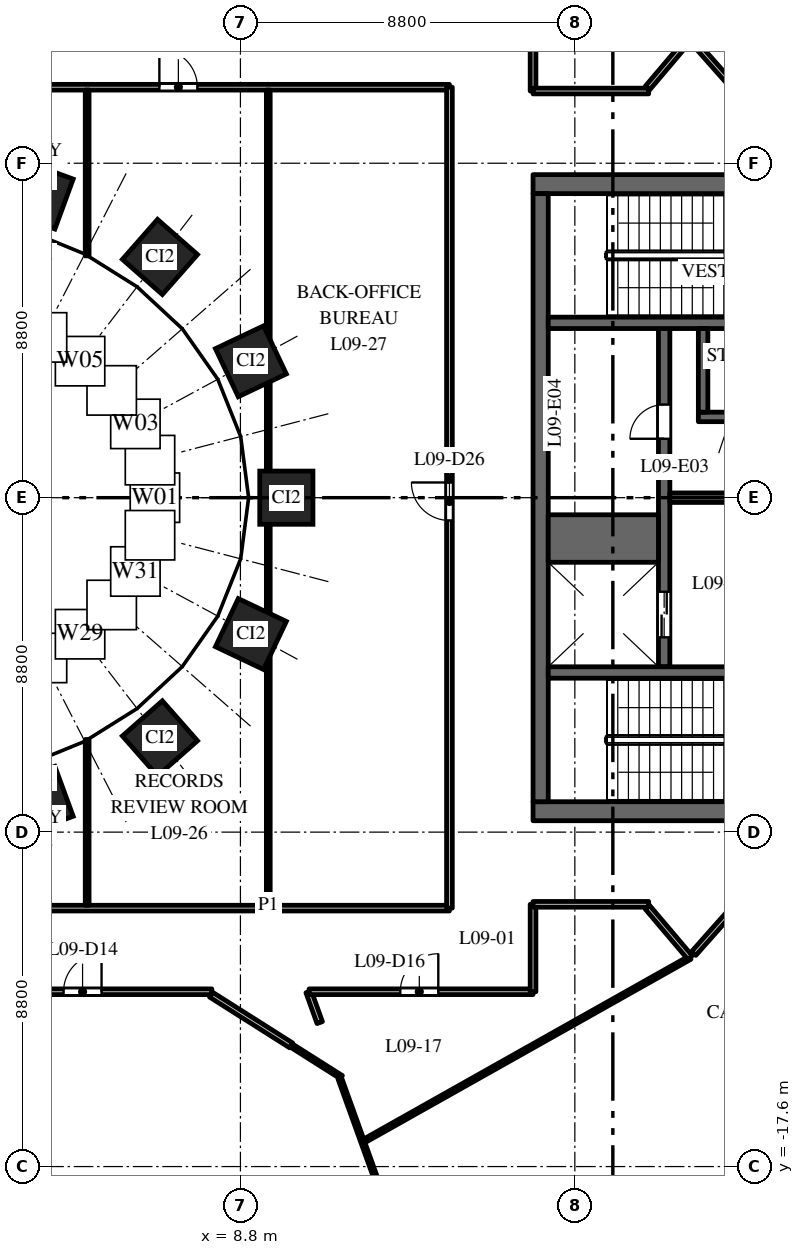
"""IFC4 building model, lengths in metres.
Left out: names, types, materials, properties, quantities, classifications, styles, units other than length and angle.
Written with IfcOpenShell. Run it as: python <this file> out.ifc"""

import sys

from ifc_helpers import new_model, si_unit, direction, frame, frame_2d, origin, origin_2d, place, context, subcontext, project, spatial, rectangle, extrude, element, fill, save


model = new_model("IFC4")
c1 = context("Model", 3, precision=1e-05, world=origin(), true_north=direction((0.0, 1.0)))
c2 = subcontext(c1, "Body", "Model", "MODEL_VIEW")
j1 = project(units=[si_unit("LENGTHUNIT", "METRE"), si_unit("PLANEANGLEUNIT", "RADIAN")], contexts=[c1])
p1 = place(None, origin())
s1 = spatial("IfcSite", under=j1, at=p1, CompositionType="ELEMENT")
p2 = place(p1, origin())
s2 = spatial("IfcBuilding", under=s1, at=p2, CompositionType="ELEMENT")
p3 = place(p2, frame((0.0, 0.0, 46.5)))
s3 = spatial("IfcBuildingStorey", under=s2, at=p3, CompositionType="ELEMENT", Elevation=46.5)
for number, where, z_axis, x_axis in (
    (1, (10.008, 0.0, 0.0), (0.0, 0.0, 1.0), (0.0, 1.0, 0.0)),
    (2, (9.076, 3.588, 0.0), (0.0, 0.0, 1.0), (-0.429, 0.903, 0.0)),
    (3, (6.682, 6.334, 0.0), (0.0, 0.0, 1.0), (-0.751, 0.66, 0.0)),
    (4, (3.501, 7.967, 0.0), (0.0, 0.0, 1.0), (-0.939, 0.344, 0.0)),
    (5, (3.501, -7.967, 0.0), (0.0, 0.0, 1.0), (0.939, 0.344, 0.0)),
    (6, (6.682, -6.334, 0.0), (0.0, 0.0, 1.0), (0.751, 0.66, 0.0)),
    (7, (9.076, -3.588, 0.0), (0.0, 0.0, 1.0), (0.429, 0.903, 0.0)),
):
    element("IfcColumn", number, at=place(p3, frame(where, z_axis=z_axis, x_axis=x_axis)), inside=s3, PredefinedType="COLUMN", context=c2, shape_type="SweptSolid", body=[
        extrude(rectangle(XDim=1.4, YDim=1.4, at=origin_2d()), origin(), (0.0, 0.0, 1.0), 4.0),
    ])
p4 = place(p3, frame((16.5, 8.25, 0.0), z_axis=(0.0, 0.0, 1.0), x_axis=(1.0, 0.0, 0.0)))
e8 = element("IfcWall", 8, at=p4, inside=s3, PredefinedType="SHEAR", context=c2, shape_type="SweptSolid", body=[
    extrude(rectangle(XDim=15.0, YDim=0.5, at=frame_2d((7.5, 0.0))), origin(), (0.0, 0.0, 1.0), 3.7),
])
p5 = place(p4, frame((6.9, 0.0, 0.0)))
e9 = element("IfcOpeningElement", 9, at=p5, cuts=e8, PredefinedType="OPENING", context=c2, shape_type="SweptSolid", body=[
    extrude(rectangle(XDim=1.2, YDim=2.1, at=frame_2d((0.6, 1.05))), frame((0.0, 0.26, 0.0), z_axis=(0.0, -1.0, 0.0), x_axis=(1.0, 0.0, 0.0)), (0.0, 0.0, 1.0), 0.52),
])
p6 = place(p4, frame((12.05, 0.0, 0.0)))
e10 = element("IfcOpeningElement", 10, at=p6, cuts=e8, PredefinedType="OPENING", context=c2, shape_type="SweptSolid", body=[
    extrude(rectangle(XDim=0.9, YDim=2.1, at=frame_2d((0.45, 1.05))), frame((0.0, 0.26, 0.0), z_axis=(0.0, -1.0, 0.0), x_axis=(1.0, 0.0, 0.0)), (0.0, 0.0, 1.0), 0.52),
])
p7 = place(p3, frame((16.5, -8.25, 0.0), z_axis=(0.0, 0.0, 1.0), x_axis=(1.0, 0.0, 0.0)))
e11 = element("IfcWall", 11, at=p7, inside=s3, PredefinedType="SHEAR", context=c2, shape_type="SweptSolid", body=[
    extrude(rectangle(XDim=15.0, YDim=0.5, at=frame_2d((7.5, 0.0))), origin(), (0.0, 0.0, 1.0), 3.7),
])
p8 = place(p7, frame((6.9, 0.0, 0.0)))
e12 = element("IfcOpeningElement", 12, at=p8, cuts=e11, PredefinedType="OPENING", context=c2, shape_type="SweptSolid", body=[
    extrude(rectangle(XDim=1.2, YDim=2.1, at=frame_2d((0.6, 1.05))), frame((0.0, 0.26, 0.0), z_axis=(0.0, -1.0, 0.0), x_axis=(1.0, 0.0, 0.0)), (0.0, 0.0, 1.0), 0.52),
])
p9 = place(p7, frame((12.425, 0.0, 0.0)))
e13 = element("IfcOpeningElement", 13, at=p9, cuts=e11, PredefinedType="OPENING", context=c2, shape_type="SweptSolid", body=[
    extrude(rectangle(XDim=0.9, YDim=2.1, at=frame_2d((0.45, 1.05))), frame((0.0, 0.26, 0.0), z_axis=(0.0, -1.0, 0.0), x_axis=(1.0, 0.0, 0.0)), (0.0, 0.0, 1.0), 0.52),
])
p10 = place(p3, frame((19.95, -4.45, 0.0), z_axis=(0.0, 0.0, 1.0), x_axis=(0.0, 1.0, 0.0)))
e14 = element("IfcWall", 14, at=p10, inside=s3, PredefinedType="SHEAR", context=c2, shape_type="SweptSolid", body=[
    extrude(rectangle(XDim=8.9, YDim=0.3, at=frame_2d((4.45, 0.0))), origin(), (0.0, 0.0, 1.0), 3.7),
])
p11 = place(p10, frame((0.775, 0.0, 0.0)))
e15 = element("IfcOpeningElement", 15, at=p11, cuts=e14, PredefinedType="OPENING", context=c2, shape_type="SweptSolid", body=[
    extrude(rectangle(XDim=1.2, YDim=2.1, at=frame_2d((0.6, 1.05))), frame((0.0, 0.16, 0.0), z_axis=(0.0, -1.0, 0.0), x_axis=(1.0, 0.0, 0.0)), (0.0, 0.0, 1.0), 0.32),
])
p12 = place(p10, frame((6.0, 0.0, 0.0)))
e16 = element("IfcOpeningElement", 16, at=p12, cuts=e14, PredefinedType="OPENING", context=c2, shape_type="SweptSolid", body=[
    extrude(rectangle(XDim=0.9, YDim=2.1, at=frame_2d((0.45, 1.05))), frame((0.0, 0.16, 0.0), z_axis=(0.0, -1.0, 0.0), x_axis=(1.0, 0.0, 0.0)), (0.0, 0.0, 1.0), 0.32),
])
p13 = place(p3, frame((20.1, 0.0, 0.0), z_axis=(0.0, 0.0, 1.0), x_axis=(1.0, 0.0, 0.0)))
e17 = element("IfcWall", 17, at=p13, inside=s3, PredefinedType="SHEAR", context=c2, shape_type="SweptSolid", body=[
    extrude(rectangle(XDim=3.28, YDim=0.25, at=frame_2d((1.64, 0.0))), origin(), (0.0, 0.0, 1.0), 3.7),
])
p14 = place(p3, frame((16.7, -8.0, 0.0), z_axis=(0.0, 0.0, 1.0), x_axis=(0.0, 1.0, 0.0)))
e18 = element("IfcWall", 18, at=p14, inside=s3, PredefinedType="SHEAR", context=c2, shape_type="SweptSolid", body=[
    extrude(rectangle(XDim=16.0, YDim=0.4, at=frame_2d((8.0, 0.0))), origin(), (0.0, 0.0, 1.0), 3.7),
])
p15 = place(p3, frame((16.9, -1.075, 0.0), z_axis=(0.0, 0.0, 1.0), x_axis=(1.0, 0.0, 0.0)))
e19 = element("IfcWall", 19, at=p15, inside=s3, PredefinedType="SHEAR", context=c2, shape_type="SweptSolid", body=[
    extrude(rectangle(XDim=2.9, YDim=1.25, at=frame_2d((1.45, 0.0))), origin(), (0.0, 0.0, 1.0), 3.7),
])
p16 = place(p3, frame((16.9, 4.6, 0.0), z_axis=(0.0, 0.0, 1.0), x_axis=(1.0, 0.0, 0.0)))
e20 = element("IfcWall", 20, at=p16, inside=s3, PredefinedType="SHEAR", context=c2, shape_type="SweptSolid", body=[
    extrude(rectangle(XDim=6.18, YDim=0.3, at=frame_2d((3.09, 0.0))), origin(), (0.0, 0.0, 1.0), 3.7),
])
p17 = place(p16, frame((4.9, 0.0, 0.0)))
e21 = element("IfcOpeningElement", 21, at=p17, cuts=e20, PredefinedType="OPENING", context=c2, shape_type="SweptSolid", body=[
    extrude(rectangle(XDim=1.1, YDim=2.1, at=frame_2d((0.55, 1.05))), frame((0.0, 0.16, 0.0), z_axis=(0.0, -1.0, 0.0), x_axis=(1.0, 0.0, 0.0)), (0.0, 0.0, 1.0), 0.32),
])
p18 = place(p3, frame((16.9, -4.6, 0.0), z_axis=(0.0, 0.0, 1.0), x_axis=(1.0, 0.0, 0.0)))
e22 = element("IfcWall", 22, at=p18, inside=s3, PredefinedType="SHEAR", context=c2, shape_type="SweptSolid", body=[
    extrude(rectangle(XDim=6.18, YDim=0.3, at=frame_2d((3.09, 0.0))), origin(), (0.0, 0.0, 1.0), 3.7),
])
p19 = place(p18, frame((4.9, 0.0, 0.0)))
e23 = element("IfcOpeningElement", 23, at=p19, cuts=e22, PredefinedType="OPENING", context=c2, shape_type="SweptSolid", body=[
    extrude(rectangle(XDim=1.1, YDim=2.1, at=frame_2d((0.55, 1.05))), frame((0.0, 0.16, 0.0), z_axis=(0.0, -1.0, 0.0), x_axis=(1.0, 0.0, 0.0)), (0.0, 0.0, 1.0), 0.32),
])
p20 = place(p3, frame((20.85, 2.125, 0.0), z_axis=(0.0, 0.0, 1.0), x_axis=(1.0, 0.0, 0.0)))
e24 = element("IfcWall", 24, at=p20, inside=s3, PredefinedType="SHEAR", context=c2, shape_type="SweptSolid", body=[
    extrude(rectangle(XDim=2.53, YDim=0.25, at=frame_2d((1.265, 0.0))), origin(), (0.0, 0.0, 1.0), 3.7),
])
p21 = place(p3, frame((20.975, 2.25, 0.0), z_axis=(0.0, 0.0, 1.0), x_axis=(0.0, 1.0, 0.0)))
e25 = element("IfcWall", 25, at=p21, inside=s3, PredefinedType="SHEAR", context=c2, shape_type="SweptSolid", body=[
    extrude(rectangle(XDim=2.2, YDim=0.25, at=frame_2d((1.1, 0.0))), origin(), (0.0, 0.0, 1.0), 3.7),
])
p22 = place(p3, frame((-14.3, -10.8, 0.0), z_axis=(0.0, 0.0, 1.0), x_axis=(1.0, 0.0, 0.0)))
e26 = element("IfcWall", 26, at=p22, inside=s3, PredefinedType="PARTITIONING", context=c2, shape_type="SweptSolid", body=[
    extrude(rectangle(XDim=28.6, YDim=0.15, at=frame_2d((14.3, 0.0))), origin(), (0.0, 0.0, 1.0), 2.85),
])
p23 = place(p22, frame((11.4, 0.0, 0.0)))
e27 = element("IfcOpeningElement", 27, at=p23, cuts=e26, PredefinedType="OPENING", context=c2, shape_type="SweptSolid", body=[
    extrude(rectangle(XDim=1.0, YDim=2.1, at=frame_2d((0.5, 1.05))), frame((0.0, 0.085, 0.0), z_axis=(0.0, -1.0, 0.0), x_axis=(1.0, 0.0, 0.0)), (0.0, 0.0, 1.0), 0.17),
])
p24 = place(p22, frame((16.167, 0.0, 0.0)))
e28 = element("IfcOpeningElement", 28, at=p24, cuts=e26, PredefinedType="OPENING", context=c2, shape_type="SweptSolid", body=[
    extrude(rectangle(XDim=1.0, YDim=2.1, at=frame_2d((0.5, 1.05))), frame((0.0, 0.085, 0.0), z_axis=(0.0, -1.0, 0.0), x_axis=(1.0, 0.0, 0.0)), (0.0, 0.0, 1.0), 0.17),
])
p25 = place(p3, frame((-14.3, 10.8, 0.0), z_axis=(0.0, 0.0, 1.0), x_axis=(1.0, 0.0, 0.0)))
e29 = element("IfcWall", 29, at=p25, inside=s3, PredefinedType="PARTITIONING", context=c2, shape_type="SweptSolid", body=[
    extrude(rectangle(XDim=28.6, YDim=0.15, at=frame_2d((14.3, 0.0))), origin(), (0.0, 0.0, 1.0), 2.85),
])
p26 = place(p25, frame((11.433, 0.0, 0.0)))
e30 = element("IfcOpeningElement", 30, at=p26, cuts=e29, PredefinedType="OPENING", context=c2, shape_type="SweptSolid", body=[
    extrude(rectangle(XDim=1.0, YDim=2.1, at=frame_2d((0.5, 1.05))), frame((0.0, 0.085, 0.0), z_axis=(0.0, -1.0, 0.0), x_axis=(1.0, 0.0, 0.0)), (0.0, 0.0, 1.0), 0.17),
])
p27 = place(p25, frame((16.2, 0.0, 0.0)))
e31 = element("IfcOpeningElement", 31, at=p27, cuts=e29, PredefinedType="OPENING", context=c2, shape_type="SweptSolid", body=[
    extrude(rectangle(XDim=1.0, YDim=2.1, at=frame_2d((0.5, 1.05))), frame((0.0, 0.085, 0.0), z_axis=(0.0, -1.0, 0.0), x_axis=(1.0, 0.0, 0.0)), (0.0, 0.0, 1.0), 0.17),
])
p28 = place(p25, frame((20.967, 0.0, 0.0)))
e32 = element("IfcOpeningElement", 32, at=p28, cuts=e29, PredefinedType="OPENING", context=c2, shape_type="SweptSolid", body=[
    extrude(rectangle(XDim=1.0, YDim=2.1, at=frame_2d((0.5, 1.05))), frame((0.0, 0.085, 0.0), z_axis=(0.0, -1.0, 0.0), x_axis=(1.0, 0.0, 0.0)), (0.0, 0.0, 1.0), 0.17),
])
p29 = place(p3, frame((1.326, -13.0, 0.0), z_axis=(0.0, 0.0, 1.0), x_axis=(1.0, 0.0, 0.0)))
e33 = element("IfcWall", 33, at=p29, inside=s3, PredefinedType="PARTITIONING", context=c2, shape_type="SweptSolid", body=[
    extrude(rectangle(XDim=6.721, YDim=0.15, at=frame_2d((3.361, 0.0))), origin(), (0.0, 0.0, 1.0), 2.85),
])
p30 = place(p29, frame((2.82, 0.0, 0.0)))
e34 = element("IfcOpeningElement", 34, at=p30, cuts=e33, PredefinedType="OPENING", context=c2, shape_type="SweptSolid", body=[
    extrude(rectangle(XDim=1.0, YDim=2.1, at=frame_2d((0.5, 1.05))), frame((0.0, 0.085, 0.0), z_axis=(0.0, -1.0, 0.0), x_axis=(1.0, 0.0, 0.0)), (0.0, 0.0, 1.0), 0.17),
])
for number, where, z_axis, x_axis in (
    (35, (4.767, -10.725, 0.0), (0.0, 0.0, 1.0), (0.0, 1.0, 0.0)),
    (36, (4.767, 6.363, 0.0), (0.0, 0.0, 1.0), (0.0, 1.0, 0.0)),
):
    element("IfcWall", number, at=place(p3, frame(where, z_axis=z_axis, x_axis=x_axis)), inside=s3, PredefinedType="PARTITIONING", context=c2, shape_type="SweptSolid", body=[
        extrude(rectangle(XDim=4.362, YDim=0.1, at=frame_2d((2.181, 0.0))), origin(), (0.0, 0.0, 1.0), 2.85),
    ])
p31 = place(p3, frame((8.028, -13.077, 0.0), z_axis=(0.0, 0.0, 1.0), x_axis=(0.844718865656, -0.53521027457, 0.0)))
e37 = element("IfcWall", 37, at=p31, inside=s3, PredefinedType="PARTITIONING", context=c2, shape_type="SweptSolid", body=[
    extrude(rectangle(XDim=2.497, YDim=0.15, at=frame_2d((1.248, 0.0))), origin(), (0.0, 0.0, 1.0), 3.7),
])
p32 = place(p3, frame((9.533, -10.725, 0.0), z_axis=(0.0, 0.0, 1.0), x_axis=(0.0, 1.0, 0.0)))
e38 = element("IfcWall", 38, at=p32, inside=s3, PredefinedType="PARTITIONING", context=c2, shape_type="SweptSolid", body=[
    extrude(rectangle(XDim=21.45, YDim=0.1, at=frame_2d((10.725, 0.0))), origin(), (0.0, 0.0, 1.0), 2.75),
])
p33 = place(p3, frame((10.137, -14.413, 0.0), z_axis=(0.0, 0.0, 1.0), x_axis=(0.844849680057, -0.535003755228, 0.0)))
e39 = element("IfcWall", 39, at=p33, inside=s3, PredefinedType="PARTITIONING", context=c2, shape_type="SweptSolid", body=[
    extrude(rectangle(XDim=1.562, YDim=0.1, at=frame_2d((0.781, 0.0))), origin(), (0.0, 0.0, 1.0), 3.7),
])
p34 = place(p3, frame((10.595, -13.0, 0.0), z_axis=(0.0, 0.0, 1.0), x_axis=(0.338378813476, -0.941009977944, 0.0)))
e40 = element("IfcWall", 40, at=p34, inside=s3, PredefinedType="PARTITIONING", context=c2, shape_type="SweptSolid", body=[
    extrude(rectangle(XDim=0.863, YDim=0.15, at=frame_2d((0.432, 0.0))), origin(), (0.0, 0.0, 1.0), 3.7),
])
p35 = place(p3, frame((10.607, -13.0, 0.0), z_axis=(0.0, 0.0, 1.0), x_axis=(1.0, 0.0, 0.0)))
e41 = element("IfcWall", 41, at=p35, inside=s3, PredefinedType="PARTITIONING", context=c2, shape_type="SweptSolid", body=[
    extrude(rectangle(XDim=5.893, YDim=0.15, at=frame_2d((2.947, 0.0))), origin(), (0.0, 0.0, 1.0), 3.7),
])
p36 = place(p35, frame((2.4, 0.0, 0.0)))
e42 = element("IfcOpeningElement", 42, at=p36, cuts=e41, PredefinedType="OPENING", context=c2, shape_type="SweptSolid", body=[
    extrude(rectangle(XDim=1.0, YDim=2.1, at=frame_2d((0.5, 1.05))), frame((0.0, 0.085, 0.0), z_axis=(0.0, -1.0, 0.0), x_axis=(1.0, 0.0, 0.0)), (0.0, 0.0, 1.0), 0.17),
])
p37 = place(p3, frame((11.416, -15.282, 0.0), z_axis=(0.0, 0.0, 1.0), x_axis=(0.338824973611, -0.940849423265, 0.0)))
e43 = element("IfcWall", 43, at=p37, inside=s3, PredefinedType="PARTITIONING", context=c2, shape_type="SweptSolid", body=[
    extrude(rectangle(XDim=10.734, YDim=0.1, at=frame_2d((5.367, 0.0))), origin(), (0.0, 0.0, 1.0), 3.7),
])
p38 = place(p3, frame((12.06, -16.924, 0.0), z_axis=(0.0, 0.0, 1.0), x_axis=(0.871521837039, 0.490356694218, 0.0)))
e44 = element("IfcWall", 44, at=p38, inside=s3, PredefinedType="PARTITIONING", context=c2, shape_type="SweptSolid", body=[
    extrude(rectangle(XDim=9.836, YDim=0.1, at=frame_2d((4.918, 0.0))), origin(), (0.0, 0.0, 1.0), 3.7),
])
p39 = place(p3, frame((14.3, -10.8, 0.0), z_axis=(0.0, 0.0, 1.0), x_axis=(0.0, 1.0, 0.0)))
e45 = element("IfcWall", 45, at=p39, inside=s3, PredefinedType="PARTITIONING", context=c2, shape_type="SweptSolid", body=[
    extrude(rectangle(XDim=21.6, YDim=0.15, at=frame_2d((10.8, 0.0))), origin(), (0.0, 0.0, 1.0), 2.75),
])
p40 = place(p39, frame((10.2, 0.0, 0.0)))
e46 = element("IfcOpeningElement", 46, at=p40, cuts=e45, PredefinedType="OPENING", context=c2, shape_type="SweptSolid", body=[
    extrude(rectangle(XDim=1.0, YDim=2.1, at=frame_2d((0.5, 1.05))), frame((0.0, 0.085, 0.0), z_axis=(0.0, -1.0, 0.0), x_axis=(1.0, 0.0, 0.0)), (0.0, 0.0, 1.0), 0.17),
])
p41 = place(p3, frame((16.5, -13.0, 0.0), z_axis=(0.0, 0.0, 1.0), x_axis=(0.0, 1.0, 0.0)))
e47 = element("IfcWall", 47, at=p41, inside=s3, PredefinedType="PARTITIONING", context=c2, shape_type="SweptSolid", body=[
    extrude(rectangle(XDim=2.3, YDim=0.15, at=frame_2d((1.15, 0.0))), origin(), (0.0, 0.0, 1.0), 3.7),
])
p42 = place(p3, frame((16.5, -10.7, 0.0), z_axis=(0.0, 0.0, 1.0), x_axis=(1.0, 0.0, 0.0)))
e48 = element("IfcWall", 48, at=p42, inside=s3, PredefinedType="PARTITIONING", context=c2, shape_type="SweptSolid", body=[
    extrude(rectangle(XDim=3.043, YDim=0.15, at=frame_2d((1.521, 0.0))), origin(), (0.0, 0.0, 1.0), 3.7),
])
p43 = place(p3, frame((16.5, 10.7, 0.0), z_axis=(0.0, 0.0, 1.0), x_axis=(0.0, 1.0, 0.0)))
e49 = element("IfcWall", 49, at=p43, inside=s3, PredefinedType="PARTITIONING", context=c2, shape_type="SweptSolid", body=[
    extrude(rectangle(XDim=2.3, YDim=0.15, at=frame_2d((1.15, 0.0))), origin(), (0.0, 0.0, 1.0), 3.7),
])
p44 = place(p3, frame((16.5, 10.7, 0.0), z_axis=(0.0, 0.0, 1.0), x_axis=(1.0, 0.0, 0.0)))
e50 = element("IfcWall", 50, at=p44, inside=s3, PredefinedType="PARTITIONING", context=c2, shape_type="SweptSolid", body=[
    extrude(rectangle(XDim=3.043, YDim=0.15, at=frame_2d((1.521, 0.0))), origin(), (0.0, 0.0, 1.0), 3.7),
])
for number, where, z_axis, x_axis in (
    (51, (19.511, -10.778, 0.0), (0.0, 0.0, 1.0), (0.646, -0.763, 0.0)),
    (52, (19.511, 10.778, 0.0), (0.0, 0.0, 1.0), (0.646, 0.763, 0.0)),
):
    element("IfcWall", number, at=place(p3, frame(where, z_axis=z_axis, x_axis=x_axis)), inside=s3, PredefinedType="PARTITIONING", context=c2, shape_type="SweptSolid", body=[
        extrude(rectangle(XDim=1.734, YDim=0.15, at=frame_2d((0.867, 0.0))), origin(), (0.0, 0.0, 1.0), 3.7),
    ])
for number, where, z_axis, x_axis in (
    (53, (20.727, -11.994, 0.0), (0.0, 0.0, 1.0), (0.664, 0.748, 0.0)),
    (54, (20.727, 11.994, 0.0), (0.0, 0.0, 1.0), (0.664, -0.748, 0.0)),
):
    element("IfcWall", number, at=place(p3, frame(where, z_axis=z_axis, x_axis=x_axis)), inside=s3, PredefinedType="PARTITIONING", context=c2, shape_type="SweptSolid", body=[
        extrude(rectangle(XDim=1.83, YDim=0.15, at=frame_2d((0.915, 0.0))), origin(), (0.0, 0.0, 1.0), 2.75),
    ])
p45 = place(p11, origin())
e55 = element("IfcDoor", 55, at=p45, inside=s3, OperationType="DOUBLE_DOOR_SLIDING", PredefinedType="DOOR", context=c2, shape_type="SweptSolid", body=[
    extrude(rectangle(XDim=1.2, YDim=2.1, at=frame_2d((0.6, 1.05))), frame((0.0, 0.025, 0.0), z_axis=(0.0, -1.0, 0.0), x_axis=(1.0, 0.0, 0.0)), (0.0, 0.0, 1.0), 0.05),
])
fill(e15, e55)
p46 = place(p12, origin())
e56 = element("IfcDoor", 56, at=p46, inside=s3, OperationType="SINGLE_SWING_RIGHT", PredefinedType="DOOR", context=c2, shape_type="SweptSolid", body=[
    extrude(rectangle(XDim=0.9, YDim=2.1, at=frame_2d((0.45, 1.05))), frame((0.0, 0.025, 0.0), z_axis=(0.0, -1.0, 0.0), x_axis=(1.0, 0.0, 0.0)), (0.0, 0.0, 1.0), 0.05),
])
fill(e16, e56)
p47 = place(p30, origin())
e57 = element("IfcDoor", 57, at=p47, inside=s3, OperationType="SINGLE_SWING_RIGHT", PredefinedType="DOOR", context=c2, shape_type="SweptSolid", body=[
    extrude(rectangle(XDim=1.0, YDim=2.1, at=frame_2d((0.5, 1.05))), frame((0.0, 0.025, 0.0), z_axis=(0.0, -1.0, 0.0), x_axis=(1.0, 0.0, 0.0)), (0.0, 0.0, 1.0), 0.05),
])
fill(e34, e57)
p48 = place(p36, origin())
e58 = element("IfcDoor", 58, at=p48, inside=s3, OperationType="SINGLE_SWING_RIGHT", PredefinedType="DOOR", context=c2, shape_type="SweptSolid", body=[
    extrude(rectangle(XDim=1.0, YDim=2.1, at=frame_2d((0.5, 1.05))), frame((0.0, 0.025, 0.0), z_axis=(0.0, -1.0, 0.0), x_axis=(1.0, 0.0, 0.0)), (0.0, 0.0, 1.0), 0.05),
])
fill(e42, e58)
p49 = place(p28, origin())
e59 = element("IfcDoor", 59, at=p49, inside=s3, OperationType="SINGLE_SWING_LEFT", PredefinedType="DOOR", context=c2, shape_type="SweptSolid", body=[
    extrude(rectangle(XDim=1.0, YDim=2.1, at=frame_2d((0.5, 1.05))), frame((0.0, 0.025, 0.0), z_axis=(0.0, -1.0, 0.0), x_axis=(1.0, 0.0, 0.0)), (0.0, 0.0, 1.0), 0.05),
])
fill(e32, e59)
p50 = place(p40, origin())
e60 = element("IfcDoor", 60, at=p50, inside=s3, OperationType="SINGLE_SWING_RIGHT", PredefinedType="DOOR", context=c2, shape_type="SweptSolid", body=[
    extrude(rectangle(XDim=1.0, YDim=2.1, at=frame_2d((0.5, 1.05))), frame((0.0, 0.025, 0.0), z_axis=(0.0, -1.0, 0.0), x_axis=(1.0, 0.0, 0.0)), (0.0, 0.0, 1.0), 0.05),
])
fill(e46, e60)
save(model, sys.argv[1])
